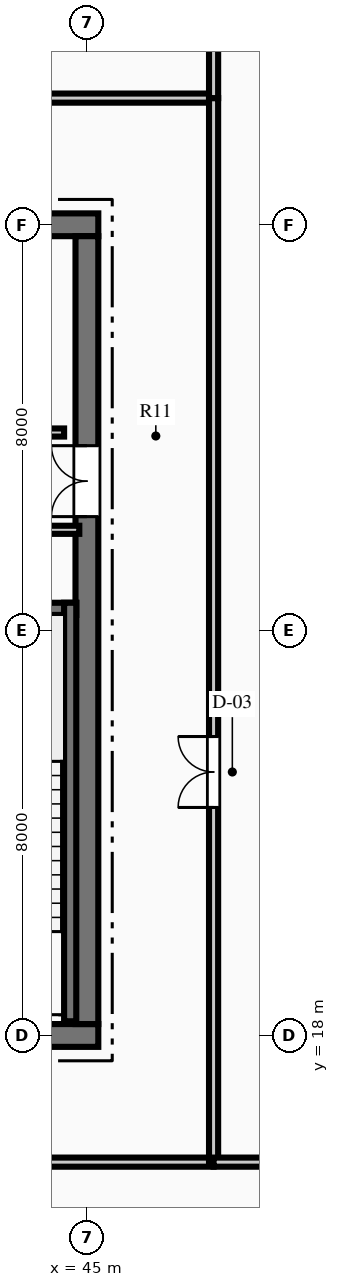
"""IFC4 building model, lengths in metres.
Left out: names, types, materials, properties, quantities, classifications, styles, units other than length and angle.
Written with IfcOpenShell. Run it as: python <this file> out.ifc"""

import sys

from ifc_helpers import new_model, si_unit, direction, frame, frame_2d, origin, place, context, subcontext, project, spatial, rectangle, extrude, element, fill, save


model = new_model("IFC4")
c1 = context("Model", 3, precision=1e-05, world=origin(), true_north=direction((0.0, 1.0)))
c2 = subcontext(c1, "Body", "Model", "MODEL_VIEW")
j1 = project(units=[si_unit("LENGTHUNIT", "METRE"), si_unit("PLANEANGLEUNIT", "RADIAN")], contexts=[c1])
p1 = place(None, origin())
s1 = spatial("IfcSite", under=j1, at=p1, CompositionType="ELEMENT")
p2 = place(p1, origin())
s2 = spatial("IfcBuilding", under=s1, at=p2, CompositionType="ELEMENT")
p3 = place(p2, frame((0.0, 0.0, 293.7)))
s3 = spatial("IfcBuildingStorey", under=s2, at=p3, CompositionType="ELEMENT", Elevation=293.7)
p4 = place(p3, frame((26.775, 18.0, 0.0), z_axis=(0.0, 0.0, 1.0), x_axis=(1.0, 0.0, 0.0)))
e1 = element("IfcWall", 1, at=p4, inside=s3, PredefinedType="SHEAR", context=c2, shape_type="SweptSolid", body=[
    extrude(rectangle(XDim=18.45, YDim=0.45, at=frame_2d((9.225, 0.0))), origin(), (0.0, 0.0, 1.0), 4.5),
])
p5 = place(p4, frame((5.875, 0.0, 0.0)))
e2 = element("IfcOpeningElement", 2, at=p5, cuts=e1, PredefinedType="OPENING", context=c2, shape_type="SweptSolid", body=[
    extrude(rectangle(XDim=1.1, YDim=2.15, at=frame_2d((0.55, 1.075))), frame((0.0, 0.235, 0.0), z_axis=(0.0, -1.0, 0.0), x_axis=(1.0, 0.0, 0.0)), (0.0, 0.0, 1.0), 0.47),
])
p6 = place(p4, frame((11.475, 0.0, 0.0)))
e3 = element("IfcOpeningElement", 3, at=p6, cuts=e1, PredefinedType="OPENING", context=c2, shape_type="SweptSolid", body=[
    extrude(rectangle(XDim=1.1, YDim=2.15, at=frame_2d((0.55, 1.075))), frame((0.0, 0.235, 0.0), z_axis=(0.0, -1.0, 0.0), x_axis=(1.0, 0.0, 0.0)), (0.0, 0.0, 1.0), 0.47),
])
p7 = place(p3, frame((26.775, 34.0, 0.0), z_axis=(0.0, 0.0, 1.0), x_axis=(1.0, 0.0, 0.0)))
e4 = element("IfcWall", 4, at=p7, inside=s3, PredefinedType="SHEAR", context=c2, shape_type="SweptSolid", body=[
    extrude(rectangle(XDim=18.45, YDim=0.45, at=frame_2d((9.225, 0.0))), origin(), (0.0, 0.0, 1.0), 4.5),
])
p8 = place(p7, frame((5.52, 0.0, 0.0)))
e5 = element("IfcOpeningElement", 5, at=p8, cuts=e4, PredefinedType="OPENING", context=c2, shape_type="SweptSolid", body=[
    extrude(rectangle(XDim=1.05, YDim=2.15, at=frame_2d((0.525, 1.075))), frame((0.0, 0.235, 0.0), z_axis=(0.0, -1.0, 0.0), x_axis=(1.0, 0.0, 0.0)), (0.0, 0.0, 1.0), 0.47),
])
p9 = place(p3, frame((45.0, 18.225, 0.0), z_axis=(0.0, 0.0, 1.0), x_axis=(0.0, 1.0, 0.0)))
e6 = element("IfcWall", 6, at=p9, inside=s3, PredefinedType="SHEAR", context=c2, shape_type="SweptSolid", body=[
    extrude(rectangle(XDim=15.55, YDim=0.45, at=frame_2d((7.775, 0.0))), origin(), (0.0, 0.0, 1.0), 4.5),
])
p10 = place(p9, frame((10.015, 0.0, 0.0)))
e7 = element("IfcOpeningElement", 7, at=p10, cuts=e6, PredefinedType="OPENING", context=c2, shape_type="SweptSolid", body=[
    extrude(rectangle(XDim=1.4, YDim=2.2, at=frame_2d((0.7, 1.1))), frame((0.0, 0.235, 0.0), z_axis=(0.0, -1.0, 0.0), x_axis=(1.0, 0.0, 0.0)), (0.0, 0.0, 1.0), 0.47),
])
p11 = place(p3, frame((40.81, 26.42, 0.0), z_axis=(0.0, 0.0, 1.0), x_axis=(1.0, 0.0, 0.0)))
e8 = element("IfcWall", 8, at=p11, inside=s3, PredefinedType="SHEAR", context=c2, shape_type="SweptSolid", body=[
    extrude(rectangle(XDim=3.98, YDim=0.24, at=frame_2d((1.99, 0.0))), origin(), (0.0, 0.0, 1.0), 4.5),
])
p12 = place(p3, frame((44.67, 18.28, 0.0), z_axis=(0.0, 0.0, 1.0), x_axis=(0.0, 1.0, 0.0)))
e9 = element("IfcWall", 9, at=p12, inside=s3, PredefinedType="SHEAR", context=c2, shape_type="SweptSolid", body=[
    extrude(rectangle(XDim=8.26, YDim=0.24, at=frame_2d((4.13, 0.0))), origin(), (0.0, 0.0, 1.0), 4.5),
])
p13 = place(p3, frame((40.8, 27.98, 0.0), z_axis=(0.0, 0.0, 1.0), x_axis=(1.0, 0.0, 0.0)))
e10 = element("IfcWall", 10, at=p13, inside=s3, PredefinedType="PARTITIONING", context=c2, shape_type="SweptSolid", body=[
    extrude(rectangle(XDim=4.05, YDim=0.16, at=frame_2d((2.025, 0.0))), origin(), (0.0, 0.0, 1.0), 4.1),
])
p14 = place(p13, frame((1.475, 0.0, 0.0)))
e11 = element("IfcOpeningElement", 11, at=p14, cuts=e10, PredefinedType="OPENING", context=c2, shape_type="SweptSolid", body=[
    extrude(rectangle(XDim=0.95, YDim=2.15, at=frame_2d((0.475, 1.075))), frame((0.0, 0.09, 0.0), z_axis=(0.0, -1.0, 0.0), x_axis=(1.0, 0.0, 0.0)), (0.0, 0.0, 1.0), 0.18),
])
p15 = place(p3, frame((40.12, 29.9, 0.0), z_axis=(0.0, 0.0, 1.0), x_axis=(1.0, 0.0, 0.0)))
e12 = element("IfcWall", 12, at=p15, inside=s3, PredefinedType="PARTITIONING", context=c2, shape_type="SweptSolid", body=[
    extrude(rectangle(XDim=4.43, YDim=0.16, at=frame_2d((2.215, 0.0))), origin(), (0.0, 0.0, 1.0), 4.1),
])
p16 = place(p15, frame((1.755, 0.0, 0.0)))
e13 = element("IfcOpeningElement", 13, at=p16, cuts=e12, PredefinedType="OPENING", context=c2, shape_type="SweptSolid", body=[
    extrude(rectangle(XDim=0.95, YDim=2.15, at=frame_2d((0.475, 1.075))), frame((0.0, 0.09, 0.0), z_axis=(0.0, -1.0, 0.0), x_axis=(1.0, 0.0, 0.0)), (0.0, 0.0, 1.0), 0.18),
])
p17 = place(p3, frame((24.5, 15.5, 0.0), z_axis=(0.0, 0.0, 1.0), x_axis=(1.0, 0.0, 0.0)))
e14 = element("IfcWall", 14, at=p17, inside=s3, PredefinedType="PARTITIONING", context=c2, shape_type="SweptSolid", body=[
    extrude(rectangle(XDim=23.0, YDim=0.18, at=frame_2d((11.5, 0.0))), origin(), (0.0, 0.0, 1.0), 4.1),
])
p18 = place(p17, frame((7.15, 0.0, 0.0)))
e15 = element("IfcOpeningElement", 15, at=p18, cuts=e14, PredefinedType="OPENING", context=c2, shape_type="SweptSolid", body=[
    extrude(rectangle(XDim=1.1, YDim=2.15, at=frame_2d((0.55, 1.075))), frame((0.0, 0.1, 0.0), z_axis=(0.0, -1.0, 0.0), x_axis=(1.0, 0.0, 0.0)), (0.0, 0.0, 1.0), 0.2),
])
p19 = place(p17, frame((14.75, 0.0, 0.0)))
e16 = element("IfcOpeningElement", 16, at=p19, cuts=e14, PredefinedType="OPENING", context=c2, shape_type="SweptSolid", body=[
    extrude(rectangle(XDim=1.1, YDim=2.15, at=frame_2d((0.55, 1.075))), frame((0.0, 0.1, 0.0), z_axis=(0.0, -1.0, 0.0), x_axis=(1.0, 0.0, 0.0)), (0.0, 0.0, 1.0), 0.2),
])
p20 = place(p3, frame((24.5, 36.5, 0.0), z_axis=(0.0, 0.0, 1.0), x_axis=(1.0, 0.0, 0.0)))
e17 = element("IfcWall", 17, at=p20, inside=s3, PredefinedType="PARTITIONING", context=c2, shape_type="SweptSolid", body=[
    extrude(rectangle(XDim=23.0, YDim=0.18, at=frame_2d((11.5, 0.0))), origin(), (0.0, 0.0, 1.0), 4.1),
])
p21 = place(p20, frame((7.15, 0.0, 0.0)))
e18 = element("IfcOpeningElement", 18, at=p21, cuts=e17, PredefinedType="OPENING", context=c2, shape_type="SweptSolid", body=[
    extrude(rectangle(XDim=1.1, YDim=2.15, at=frame_2d((0.55, 1.075))), frame((0.0, 0.1, 0.0), z_axis=(0.0, -1.0, 0.0), x_axis=(1.0, 0.0, 0.0)), (0.0, 0.0, 1.0), 0.2),
])
p22 = place(p20, frame((14.75, 0.0, 0.0)))
e19 = element("IfcOpeningElement", 19, at=p22, cuts=e17, PredefinedType="OPENING", context=c2, shape_type="SweptSolid", body=[
    extrude(rectangle(XDim=1.1, YDim=2.15, at=frame_2d((0.55, 1.075))), frame((0.0, 0.1, 0.0), z_axis=(0.0, -1.0, 0.0), x_axis=(1.0, 0.0, 0.0)), (0.0, 0.0, 1.0), 0.2),
])
p23 = place(p3, frame((47.5, 15.5, 0.0), z_axis=(0.0, 0.0, 1.0), x_axis=(0.0, 1.0, 0.0)))
e20 = element("IfcWall", 20, at=p23, inside=s3, PredefinedType="PARTITIONING", context=c2, shape_type="SweptSolid", body=[
    extrude(rectangle(XDim=21.0, YDim=0.18, at=frame_2d((10.5, 0.0))), origin(), (0.0, 0.0, 1.0), 4.1),
])
p24 = place(p23, frame((7.0, 0.0, 0.0)))
e21 = element("IfcOpeningElement", 21, at=p24, cuts=e20, PredefinedType="OPENING", context=c2, shape_type="SweptSolid", body=[
    extrude(rectangle(XDim=1.4, YDim=2.2, at=frame_2d((0.7, 1.1))), frame((0.0, 0.1, 0.0), z_axis=(0.0, -1.0, 0.0), x_axis=(1.0, 0.0, 0.0)), (0.0, 0.0, 1.0), 0.2),
])
p25 = place(p3, frame((47.5, 15.5, 0.0), z_axis=(0.0, 0.0, 1.0), x_axis=(1.0, 0.0, 0.0)))
e22 = element("IfcWall", 22, at=p25, inside=s3, PredefinedType="PARTITIONING", context=c2, shape_type="SweptSolid", body=[
    extrude(rectangle(XDim=9.71, YDim=0.18, at=frame_2d((4.855, 0.0))), origin(), (0.0, 0.0, 1.0), 3.478),
])
p26 = place(p3, frame((47.5, 36.5, 0.0), z_axis=(0.0, 0.0, 1.0), x_axis=(0.0, 1.0, 0.0)))
e23 = element("IfcWall", 23, at=p26, inside=s3, PredefinedType="PARTITIONING", context=c2, shape_type="SweptSolid", body=[
    extrude(rectangle(XDim=10.751, YDim=0.18, at=frame_2d((5.375, 0.0))), origin(), (0.0, 0.0, 1.0), 3.478),
])
p27 = place(p10, origin())
e24 = element("IfcDoor", 24, at=p27, inside=s3, OperationType="DOUBLE_DOOR_SINGLE_SWING", PredefinedType="DOOR", context=c2, shape_type="SweptSolid", body=[
    extrude(rectangle(XDim=1.4, YDim=2.2, at=frame_2d((0.7, 1.1))), frame((0.0, 0.025, 0.0), z_axis=(0.0, -1.0, 0.0), x_axis=(1.0, 0.0, 0.0)), (0.0, 0.0, 1.0), 0.05),
])
fill(e7, e24)
p28 = place(p24, origin())
e25 = element("IfcDoor", 25, at=p28, inside=s3, OperationType="DOUBLE_DOOR_SINGLE_SWING", PredefinedType="DOOR", context=c2, shape_type="SweptSolid", body=[
    extrude(rectangle(XDim=1.4, YDim=2.2, at=frame_2d((0.7, 1.1))), frame((0.0, 0.025, 0.0), z_axis=(0.0, -1.0, 0.0), x_axis=(1.0, 0.0, 0.0)), (0.0, 0.0, 1.0), 0.05),
])
fill(e21, e25)
save(model, sys.argv[1])
